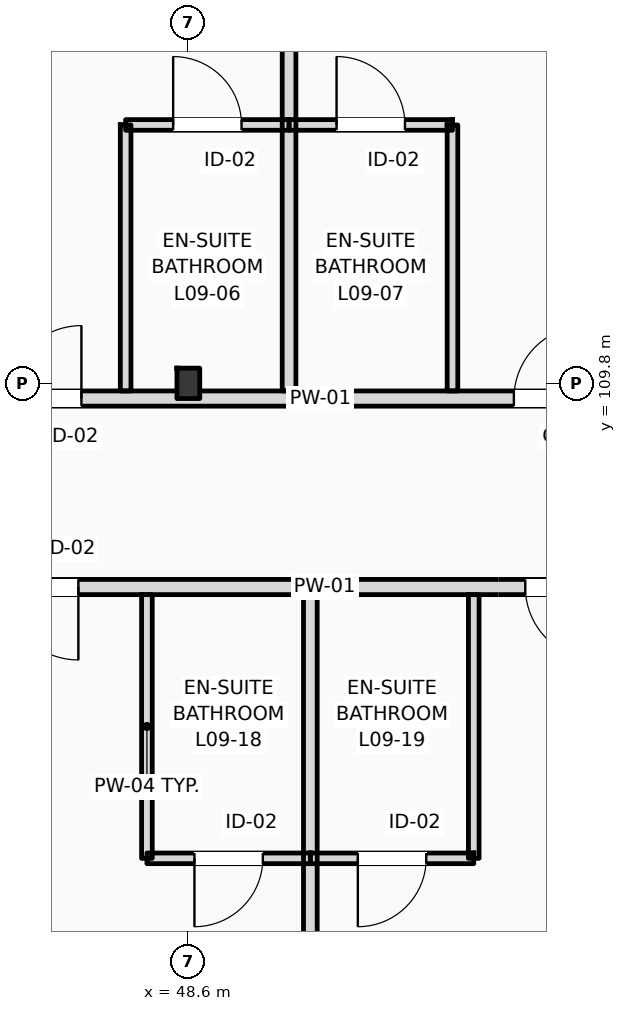
"""IFC4 building model, lengths in metres.
Left out: names, types, materials, properties, quantities, classifications, styles, units other than length and angle.
Written with IfcOpenShell. Run it as: python <this file> out.ifc"""

import sys

from ifc_helpers import new_model, si_unit, direction, frame, frame_2d, origin, origin_2d, place, context, subcontext, project, spatial, rectangle, i_section, extrude, element, fill, save


model = new_model("IFC4")
c1 = context("Model", 3, precision=1e-05, world=origin(), true_north=direction((0.0, 1.0)))
c2 = subcontext(c1, "Body", "Model", "MODEL_VIEW")
j1 = project(units=[si_unit("LENGTHUNIT", "METRE"), si_unit("PLANEANGLEUNIT", "RADIAN")], contexts=[c1])
p1 = place(None, origin())
s1 = spatial("IfcSite", under=j1, at=p1, CompositionType="ELEMENT")
p2 = place(p1, origin())
s2 = spatial("IfcBuilding", under=s1, at=p2, CompositionType="ELEMENT")
p3 = place(p2, frame((0.0, 0.0, 39.0)))
s3 = spatial("IfcBuildingStorey", under=s2, at=p3, CompositionType="ELEMENT", Elevation=39.0)
p4 = place(p3, frame((48.6, 109.8, 0.0), z_axis=(0.0, 0.0, 1.0), x_axis=(1.0, 0.0, 0.0)))
e1 = element("IfcColumn", 1, at=p4, inside=s3, PredefinedType="COLUMN", context=c2, shape_type="SweptSolid", body=[
    extrude(i_section(OverallWidth=0.3, OverallDepth=0.4, WebThickness=0.013, FlangeThickness=0.024, FilletRadius=0.027, at=origin_2d()), origin(), (0.0, 0.0, 1.0), 3.6),
])
p5 = place(p3, frame((10.65, 109.6, 0.0), z_axis=(0.0, 0.0, 1.0), x_axis=(1.0, 0.0, 0.0)))
e2 = element("IfcWall", 2, at=p5, inside=s3, PredefinedType="PARTITIONING", context=c2, shape_type="SweptSolid", body=[
    extrude(rectangle(XDim=84.61, YDim=0.2, at=frame_2d((42.305, 0.0))), origin(), (0.0, 0.0, 1.0), 2.82),
])
p6 = place(p5, frame((15.49, 0.0, 0.0)))
e3 = element("IfcOpeningElement", 3, at=p6, cuts=e2, PredefinedType="OPENING", context=c2, shape_type="SweptSolid", body=[
    extrude(rectangle(XDim=1.02, YDim=2.2, at=frame_2d((0.51, 1.1))), frame((0.0, 0.11, 0.0), z_axis=(0.0, -1.0, 0.0), x_axis=(1.0, 0.0, 0.0)), (0.0, 0.0, 1.0), 0.22),
])
p7 = place(p5, frame((19.703, 0.0, 0.0)))
e4 = element("IfcOpeningElement", 4, at=p7, cuts=e2, PredefinedType="OPENING", context=c2, shape_type="SweptSolid", body=[
    extrude(rectangle(XDim=1.02, YDim=2.2, at=frame_2d((0.51, 1.1))), frame((0.0, 0.11, 0.0), z_axis=(0.0, -1.0, 0.0), x_axis=(1.0, 0.0, 0.0)), (0.0, 0.0, 1.0), 0.22),
])
p8 = place(p5, frame((24.203, 0.0, 0.0)))
e5 = element("IfcOpeningElement", 5, at=p8, cuts=e2, PredefinedType="OPENING", context=c2, shape_type="SweptSolid", body=[
    extrude(rectangle(XDim=1.02, YDim=2.2, at=frame_2d((0.51, 1.1))), frame((0.0, 0.11, 0.0), z_axis=(0.0, -1.0, 0.0), x_axis=(1.0, 0.0, 0.0)), (0.0, 0.0, 1.0), 0.22),
])
p9 = place(p5, frame((26.552, 0.0, 0.0)))
e6 = element("IfcOpeningElement", 6, at=p9, cuts=e2, PredefinedType="OPENING", context=c2, shape_type="SweptSolid", body=[
    extrude(rectangle(XDim=1.02, YDim=2.2, at=frame_2d((0.51, 1.1))), frame((0.0, 0.11, 0.0), z_axis=(0.0, -1.0, 0.0), x_axis=(1.0, 0.0, 0.0)), (0.0, 0.0, 1.0), 0.22),
])
p10 = place(p5, frame((33.233, 0.0, 0.0)))
e7 = element("IfcOpeningElement", 7, at=p10, cuts=e2, PredefinedType="OPENING", context=c2, shape_type="SweptSolid", body=[
    extrude(rectangle(XDim=0.96, YDim=2.2, at=frame_2d((0.48, 1.1))), frame((0.0, 0.11, 0.0), z_axis=(0.0, -1.0, 0.0), x_axis=(1.0, 0.0, 0.0)), (0.0, 0.0, 1.0), 0.22),
])
p11 = place(p5, frame((35.583, 0.0, 0.0)))
e8 = element("IfcOpeningElement", 8, at=p11, cuts=e2, PredefinedType="OPENING", context=c2, shape_type="SweptSolid", body=[
    extrude(rectangle(XDim=0.96, YDim=2.2, at=frame_2d((0.48, 1.1))), frame((0.0, 0.11, 0.0), z_axis=(0.0, -1.0, 0.0), x_axis=(1.0, 0.0, 0.0)), (0.0, 0.0, 1.0), 0.22),
])
p12 = place(p5, frame((42.233, 0.0, 0.0)))
e9 = element("IfcOpeningElement", 9, at=p12, cuts=e2, PredefinedType="OPENING", context=c2, shape_type="SweptSolid", body=[
    extrude(rectangle(XDim=0.96, YDim=2.2, at=frame_2d((0.48, 1.1))), frame((0.0, 0.11, 0.0), z_axis=(0.0, -1.0, 0.0), x_axis=(1.0, 0.0, 0.0)), (0.0, 0.0, 1.0), 0.22),
])
p13 = place(p5, frame((46.983, 0.0, 0.0)))
e10 = element("IfcOpeningElement", 10, at=p13, cuts=e2, PredefinedType="OPENING", context=c2, shape_type="SweptSolid", body=[
    extrude(rectangle(XDim=0.96, YDim=2.2, at=frame_2d((0.48, 1.1))), frame((0.0, 0.11, 0.0), z_axis=(0.0, -1.0, 0.0), x_axis=(1.0, 0.0, 0.0)), (0.0, 0.0, 1.0), 0.22),
])
p14 = place(p5, frame((51.233, 0.0, 0.0)))
e11 = element("IfcOpeningElement", 11, at=p14, cuts=e2, PredefinedType="OPENING", context=c2, shape_type="SweptSolid", body=[
    extrude(rectangle(XDim=0.96, YDim=2.2, at=frame_2d((0.48, 1.1))), frame((0.0, 0.11, 0.0), z_axis=(0.0, -1.0, 0.0), x_axis=(1.0, 0.0, 0.0)), (0.0, 0.0, 1.0), 0.22),
])
p15 = place(p5, frame((55.733, 0.0, 0.0)))
e12 = element("IfcOpeningElement", 12, at=p15, cuts=e2, PredefinedType="OPENING", context=c2, shape_type="SweptSolid", body=[
    extrude(rectangle(XDim=0.96, YDim=2.2, at=frame_2d((0.48, 1.1))), frame((0.0, 0.11, 0.0), z_axis=(0.0, -1.0, 0.0), x_axis=(1.0, 0.0, 0.0)), (0.0, 0.0, 1.0), 0.22),
])
p16 = place(p5, frame((58.083, 0.0, 0.0)))
e13 = element("IfcOpeningElement", 13, at=p16, cuts=e2, PredefinedType="OPENING", context=c2, shape_type="SweptSolid", body=[
    extrude(rectangle(XDim=0.96, YDim=2.2, at=frame_2d((0.48, 1.1))), frame((0.0, 0.11, 0.0), z_axis=(0.0, -1.0, 0.0), x_axis=(1.0, 0.0, 0.0)), (0.0, 0.0, 1.0), 0.22),
])
p17 = place(p5, frame((64.732, 0.0, 0.0)))
e14 = element("IfcOpeningElement", 14, at=p17, cuts=e2, PredefinedType="OPENING", context=c2, shape_type="SweptSolid", body=[
    extrude(rectangle(XDim=0.96, YDim=2.2, at=frame_2d((0.48, 1.1))), frame((0.0, 0.11, 0.0), z_axis=(0.0, -1.0, 0.0), x_axis=(1.0, 0.0, 0.0)), (0.0, 0.0, 1.0), 0.22),
])
p18 = place(p5, frame((66.832, 0.0, 0.0)))
e15 = element("IfcOpeningElement", 15, at=p18, cuts=e2, PredefinedType="OPENING", context=c2, shape_type="SweptSolid", body=[
    extrude(rectangle(XDim=0.96, YDim=2.2, at=frame_2d((0.48, 1.1))), frame((0.0, 0.11, 0.0), z_axis=(0.0, -1.0, 0.0), x_axis=(1.0, 0.0, 0.0)), (0.0, 0.0, 1.0), 0.22),
])
p19 = place(p5, frame((73.732, 0.0, 0.0)))
e16 = element("IfcOpeningElement", 16, at=p19, cuts=e2, PredefinedType="OPENING", context=c2, shape_type="SweptSolid", body=[
    extrude(rectangle(XDim=0.96, YDim=2.2, at=frame_2d((0.48, 1.1))), frame((0.0, 0.11, 0.0), z_axis=(0.0, -1.0, 0.0), x_axis=(1.0, 0.0, 0.0)), (0.0, 0.0, 1.0), 0.22),
])
p20 = place(p5, frame((78.233, 0.0, 0.0)))
e17 = element("IfcOpeningElement", 17, at=p20, cuts=e2, PredefinedType="OPENING", context=c2, shape_type="SweptSolid", body=[
    extrude(rectangle(XDim=0.96, YDim=2.2, at=frame_2d((0.48, 1.1))), frame((0.0, 0.11, 0.0), z_axis=(0.0, -1.0, 0.0), x_axis=(1.0, 0.0, 0.0)), (0.0, 0.0, 1.0), 0.22),
])
p21 = place(p5, frame((80.62, 0.0, 0.0)))
e18 = element("IfcOpeningElement", 18, at=p21, cuts=e2, PredefinedType="OPENING", context=c2, shape_type="SweptSolid", body=[
    extrude(rectangle(XDim=0.96, YDim=2.2, at=frame_2d((0.48, 1.1))), frame((0.0, 0.11, 0.0), z_axis=(0.0, -1.0, 0.0), x_axis=(1.0, 0.0, 0.0)), (0.0, 0.0, 1.0), 0.22),
])
p22 = place(p5, frame((2.716, 0.0, 0.0)))
e19 = element("IfcOpeningElement", 19, at=p22, cuts=e2, PredefinedType="OPENING", context=c2, shape_type="SweptSolid", body=[
    extrude(rectangle(XDim=1.35, YDim=2.25, at=frame_2d((0.675, 1.125))), frame((0.0, 0.11, 0.0), z_axis=(0.0, -1.0, 0.0), x_axis=(1.0, 0.0, 0.0)), (0.0, 0.0, 1.0), 0.22),
])
p23 = place(p5, frame((6.65, 0.0, 0.0)))
e20 = element("IfcOpeningElement", 20, at=p23, cuts=e2, PredefinedType="OPENING", context=c2, shape_type="SweptSolid", body=[
    extrude(rectangle(XDim=1.35, YDim=2.25, at=frame_2d((0.675, 1.125))), frame((0.0, 0.11, 0.0), z_axis=(0.0, -1.0, 0.0), x_axis=(1.0, 0.0, 0.0)), (0.0, 0.0, 1.0), 0.22),
])
p24 = place(p5, frame((10.583, 0.0, 0.0)))
e21 = element("IfcOpeningElement", 21, at=p24, cuts=e2, PredefinedType="OPENING", context=c2, shape_type="SweptSolid", body=[
    extrude(rectangle(XDim=1.35, YDim=2.25, at=frame_2d((0.675, 1.125))), frame((0.0, 0.11, 0.0), z_axis=(0.0, -1.0, 0.0), x_axis=(1.0, 0.0, 0.0)), (0.0, 0.0, 1.0), 0.22),
])
p25 = place(p3, frame((40.76, 107.12, 0.0), z_axis=(0.0, 0.0, 1.0), x_axis=(1.0, 0.0, 0.0)))
e22 = element("IfcWall", 22, at=p25, inside=s3, PredefinedType="PARTITIONING", context=c2, shape_type="SweptSolid", body=[
    extrude(rectangle(XDim=23.44, YDim=0.2, at=frame_2d((11.72, 0.0))), origin(), (0.0, 0.0, 1.0), 3.38),
])
p26 = place(p25, frame((2.855, 0.0, 0.0)))
e23 = element("IfcOpeningElement", 23, at=p26, cuts=e22, PredefinedType="OPENING", context=c2, shape_type="SweptSolid", body=[
    extrude(rectangle(XDim=0.96, YDim=2.2, at=frame_2d((0.48, 1.1))), frame((0.0, 0.11, 0.0), z_axis=(0.0, -1.0, 0.0), x_axis=(1.0, 0.0, 0.0)), (0.0, 0.0, 1.0), 0.22),
])
p27 = place(p25, frame((5.433, 0.0, 0.0)))
e24 = element("IfcOpeningElement", 24, at=p27, cuts=e22, PredefinedType="OPENING", context=c2, shape_type="SweptSolid", body=[
    extrude(rectangle(XDim=0.96, YDim=2.2, at=frame_2d((0.48, 1.1))), frame((0.0, 0.11, 0.0), z_axis=(0.0, -1.0, 0.0), x_axis=(1.0, 0.0, 0.0)), (0.0, 0.0, 1.0), 0.22),
])
p28 = place(p25, frame((12.273, 0.0, 0.0)))
e25 = element("IfcOpeningElement", 25, at=p28, cuts=e22, PredefinedType="OPENING", context=c2, shape_type="SweptSolid", body=[
    extrude(rectangle(XDim=0.96, YDim=2.2, at=frame_2d((0.48, 1.1))), frame((0.0, 0.11, 0.0), z_axis=(0.0, -1.0, 0.0), x_axis=(1.0, 0.0, 0.0)), (0.0, 0.0, 1.0), 0.22),
])
p29 = place(p25, frame((16.963, 0.0, 0.0)))
e26 = element("IfcOpeningElement", 26, at=p29, cuts=e22, PredefinedType="OPENING", context=c2, shape_type="SweptSolid", body=[
    extrude(rectangle(XDim=0.96, YDim=2.2, at=frame_2d((0.48, 1.1))), frame((0.0, 0.11, 0.0), z_axis=(0.0, -1.0, 0.0), x_axis=(1.0, 0.0, 0.0)), (0.0, 0.0, 1.0), 0.22),
])
p30 = place(p25, frame((19.578, 0.0, 0.0)))
e27 = element("IfcOpeningElement", 27, at=p30, cuts=e22, PredefinedType="OPENING", context=c2, shape_type="SweptSolid", body=[
    extrude(rectangle(XDim=0.96, YDim=2.2, at=frame_2d((0.48, 1.1))), frame((0.0, 0.11, 0.0), z_axis=(0.0, -1.0, 0.0), x_axis=(1.0, 0.0, 0.0)), (0.0, 0.0, 1.0), 0.22),
])
p31 = place(p3, frame((49.925, 109.7, 0.0), z_axis=(0.0, 0.0, 1.0), x_axis=(0.0, 1.0, 0.0)))
e28 = element("IfcWall", 28, at=p31, inside=s3, PredefinedType="PARTITIONING", context=c2, shape_type="SweptSolid", body=[
    extrude(rectangle(XDim=8.15, YDim=0.18, at=frame_2d((4.075, 0.0))), origin(), (0.0, 0.0, 1.0), 3.38),
])
p32 = place(p3, frame((47.775, 109.7, 0.0), z_axis=(0.0, 0.0, 1.0), x_axis=(0.0, 1.0, 0.0)))
e29 = element("IfcWall", 29, at=p32, inside=s3, PredefinedType="PARTITIONING", context=c2, shape_type="SweptSolid", body=[
    extrude(rectangle(XDim=3.5, YDim=0.14, at=frame_2d((1.75, 0.0))), origin(), (0.0, 0.0, 1.0), 3.38),
])
p33 = place(p3, frame((47.775, 113.2, 0.0), z_axis=(0.0, 0.0, 1.0), x_axis=(1.0, 0.0, 0.0)))
e30 = element("IfcWall", 30, at=p33, inside=s3, PredefinedType="PARTITIONING", context=c2, shape_type="SweptSolid", body=[
    extrude(rectangle(XDim=2.15, YDim=0.14, at=frame_2d((1.075, 0.0))), origin(), (0.0, 0.0, 1.0), 3.38),
])
p34 = place(p33, frame((0.625, 0.0, 0.0)))
e31 = element("IfcOpeningElement", 31, at=p34, cuts=e30, PredefinedType="OPENING", context=c2, shape_type="SweptSolid", body=[
    extrude(rectangle(XDim=0.9, YDim=2.1, at=frame_2d((0.45, 1.05))), frame((0.0, 0.08, 0.0), z_axis=(0.0, -1.0, 0.0), x_axis=(1.0, 0.0, 0.0)), (0.0, 0.0, 1.0), 0.16),
])
p35 = place(p3, frame((52.075, 109.7, 0.0), z_axis=(0.0, 0.0, 1.0), x_axis=(0.0, 1.0, 0.0)))
e32 = element("IfcWall", 32, at=p35, inside=s3, PredefinedType="PARTITIONING", context=c2, shape_type="SweptSolid", body=[
    extrude(rectangle(XDim=3.5, YDim=0.14, at=frame_2d((1.75, 0.0))), origin(), (0.0, 0.0, 1.0), 3.38),
])
p36 = place(p3, frame((49.925, 113.2, 0.0), z_axis=(0.0, 0.0, 1.0), x_axis=(1.0, 0.0, 0.0)))
e33 = element("IfcWall", 33, at=p36, inside=s3, PredefinedType="PARTITIONING", context=c2, shape_type="SweptSolid", body=[
    extrude(rectangle(XDim=2.15, YDim=0.14, at=frame_2d((1.075, 0.0))), origin(), (0.0, 0.0, 1.0), 3.38),
])
p37 = place(p36, frame((0.625, 0.0, 0.0)))
e34 = element("IfcOpeningElement", 34, at=p37, cuts=e33, PredefinedType="OPENING", context=c2, shape_type="SweptSolid", body=[
    extrude(rectangle(XDim=0.9, YDim=2.1, at=frame_2d((0.45, 1.05))), frame((0.0, 0.08, 0.0), z_axis=(0.0, -1.0, 0.0), x_axis=(1.0, 0.0, 0.0)), (0.0, 0.0, 1.0), 0.16),
])
p38 = place(p3, frame((50.205, 96.14, 0.0), z_axis=(0.0, 0.0, 1.0), x_axis=(0.0, 1.0, 0.0)))
e35 = element("IfcWall", 35, at=p38, inside=s3, PredefinedType="PARTITIONING", context=c2, shape_type="SweptSolid", body=[
    extrude(rectangle(XDim=10.88, YDim=0.18, at=frame_2d((5.44, 0.0))), origin(), (0.0, 0.0, 1.0), 3.38),
])
p39 = place(p3, frame((48.055, 103.55, 0.0), z_axis=(0.0, 0.0, 1.0), x_axis=(0.0, 1.0, 0.0)))
e36 = element("IfcWall", 36, at=p39, inside=s3, PredefinedType="PARTITIONING", context=c2, shape_type="SweptSolid", body=[
    extrude(rectangle(XDim=3.47, YDim=0.14, at=frame_2d((1.735, 0.0))), origin(), (0.0, 0.0, 1.0), 3.38),
])
p40 = place(p3, frame((48.055, 103.55, 0.0), z_axis=(0.0, 0.0, 1.0), x_axis=(1.0, 0.0, 0.0)))
e37 = element("IfcWall", 37, at=p40, inside=s3, PredefinedType="PARTITIONING", context=c2, shape_type="SweptSolid", body=[
    extrude(rectangle(XDim=2.15, YDim=0.14, at=frame_2d((1.075, 0.0))), origin(), (0.0, 0.0, 1.0), 3.38),
])
p41 = place(p40, frame((0.625, 0.0, 0.0)))
e38 = element("IfcOpeningElement", 38, at=p41, cuts=e37, PredefinedType="OPENING", context=c2, shape_type="SweptSolid", body=[
    extrude(rectangle(XDim=0.9, YDim=2.1, at=frame_2d((0.45, 1.05))), frame((0.0, 0.08, 0.0), z_axis=(0.0, -1.0, 0.0), x_axis=(1.0, 0.0, 0.0)), (0.0, 0.0, 1.0), 0.16),
])
p42 = place(p3, frame((52.355, 103.55, 0.0), z_axis=(0.0, 0.0, 1.0), x_axis=(0.0, 1.0, 0.0)))
e39 = element("IfcWall", 39, at=p42, inside=s3, PredefinedType="PARTITIONING", context=c2, shape_type="SweptSolid", body=[
    extrude(rectangle(XDim=3.47, YDim=0.14, at=frame_2d((1.735, 0.0))), origin(), (0.0, 0.0, 1.0), 3.38),
])
p43 = place(p3, frame((50.205, 103.55, 0.0), z_axis=(0.0, 0.0, 1.0), x_axis=(1.0, 0.0, 0.0)))
e40 = element("IfcWall", 40, at=p43, inside=s3, PredefinedType="PARTITIONING", context=c2, shape_type="SweptSolid", body=[
    extrude(rectangle(XDim=2.15, YDim=0.14, at=frame_2d((1.075, 0.0))), origin(), (0.0, 0.0, 1.0), 3.38),
])
p44 = place(p43, frame((0.625, 0.0, 0.0)))
e41 = element("IfcOpeningElement", 41, at=p44, cuts=e40, PredefinedType="OPENING", context=c2, shape_type="SweptSolid", body=[
    extrude(rectangle(XDim=0.9, YDim=2.1, at=frame_2d((0.45, 1.05))), frame((0.0, 0.08, 0.0), z_axis=(0.0, -1.0, 0.0), x_axis=(1.0, 0.0, 0.0)), (0.0, 0.0, 1.0), 0.16),
])
p45 = place(p11, origin())
e42 = element("IfcDoor", 42, at=p45, inside=s3, OperationType="SINGLE_SWING_RIGHT", PredefinedType="DOOR", context=c2, shape_type="SweptSolid", body=[
    extrude(rectangle(XDim=0.96, YDim=2.2, at=frame_2d((0.48, 1.1))), frame((0.0, 0.025, 0.0), z_axis=(0.0, -1.0, 0.0), x_axis=(1.0, 0.0, 0.0)), (0.0, 0.0, 1.0), 0.05),
])
fill(e8, e42)
p46 = place(p34, origin())
e43 = element("IfcDoor", 43, at=p46, inside=s3, OperationType="SINGLE_SWING_LEFT", PredefinedType="DOOR", context=c2, shape_type="SweptSolid", body=[
    extrude(rectangle(XDim=0.9, YDim=2.1, at=frame_2d((0.45, 1.05))), frame((0.0, 0.025, 0.0), z_axis=(0.0, -1.0, 0.0), x_axis=(1.0, 0.0, 0.0)), (0.0, 0.0, 1.0), 0.05),
])
fill(e31, e43)
p47 = place(p12, origin())
e44 = element("IfcDoor", 44, at=p47, inside=s3, OperationType="SINGLE_SWING_RIGHT", PredefinedType="DOOR", context=c2, shape_type="SweptSolid", body=[
    extrude(rectangle(XDim=0.96, YDim=2.2, at=frame_2d((0.48, 1.1))), frame((0.0, 0.025, 0.0), z_axis=(0.0, -1.0, 0.0), x_axis=(1.0, 0.0, 0.0)), (0.0, 0.0, 1.0), 0.05),
])
fill(e9, e44)
p48 = place(p37, origin())
e45 = element("IfcDoor", 45, at=p48, inside=s3, OperationType="SINGLE_SWING_LEFT", PredefinedType="DOOR", context=c2, shape_type="SweptSolid", body=[
    extrude(rectangle(XDim=0.9, YDim=2.1, at=frame_2d((0.45, 1.05))), frame((0.0, 0.025, 0.0), z_axis=(0.0, -1.0, 0.0), x_axis=(1.0, 0.0, 0.0)), (0.0, 0.0, 1.0), 0.05),
])
fill(e34, e45)
p49 = place(p27, frame((0.96, 0.0, 0.0), z_axis=(0.0, 0.0, 1.0), x_axis=(-1.0, 0.0, 0.0)))
e46 = element("IfcDoor", 46, at=p49, inside=s3, OperationType="SINGLE_SWING_RIGHT", PredefinedType="DOOR", context=c2, shape_type="SweptSolid", body=[
    extrude(rectangle(XDim=0.96, YDim=2.2, at=frame_2d((0.48, 1.1))), frame((0.0, 0.025, 0.0), z_axis=(0.0, -1.0, 0.0), x_axis=(1.0, 0.0, 0.0)), (0.0, 0.0, 1.0), 0.05),
])
fill(e24, e46)
p50 = place(p41, frame((0.9, 0.0, 0.0), z_axis=(0.0, 0.0, 1.0), x_axis=(-1.0, 0.0, 0.0)))
e47 = element("IfcDoor", 47, at=p50, inside=s3, OperationType="SINGLE_SWING_LEFT", PredefinedType="DOOR", context=c2, shape_type="SweptSolid", body=[
    extrude(rectangle(XDim=0.9, YDim=2.1, at=frame_2d((0.45, 1.05))), frame((0.0, 0.025, 0.0), z_axis=(0.0, -1.0, 0.0), x_axis=(1.0, 0.0, 0.0)), (0.0, 0.0, 1.0), 0.05),
])
fill(e38, e47)
p51 = place(p28, frame((0.96, 0.0, 0.0), z_axis=(0.0, 0.0, 1.0), x_axis=(-1.0, 0.0, 0.0)))
e48 = element("IfcDoor", 48, at=p51, inside=s3, OperationType="SINGLE_SWING_RIGHT", PredefinedType="DOOR", context=c2, shape_type="SweptSolid", body=[
    extrude(rectangle(XDim=0.96, YDim=2.2, at=frame_2d((0.48, 1.1))), frame((0.0, 0.025, 0.0), z_axis=(0.0, -1.0, 0.0), x_axis=(1.0, 0.0, 0.0)), (0.0, 0.0, 1.0), 0.05),
])
fill(e25, e48)
p52 = place(p44, frame((0.9, 0.0, 0.0), z_axis=(0.0, 0.0, 1.0), x_axis=(-1.0, 0.0, 0.0)))
e49 = element("IfcDoor", 49, at=p52, inside=s3, OperationType="SINGLE_SWING_LEFT", PredefinedType="DOOR", context=c2, shape_type="SweptSolid", body=[
    extrude(rectangle(XDim=0.9, YDim=2.1, at=frame_2d((0.45, 1.05))), frame((0.0, 0.025, 0.0), z_axis=(0.0, -1.0, 0.0), x_axis=(1.0, 0.0, 0.0)), (0.0, 0.0, 1.0), 0.05),
])
fill(e41, e49)
save(model, sys.argv[1])
